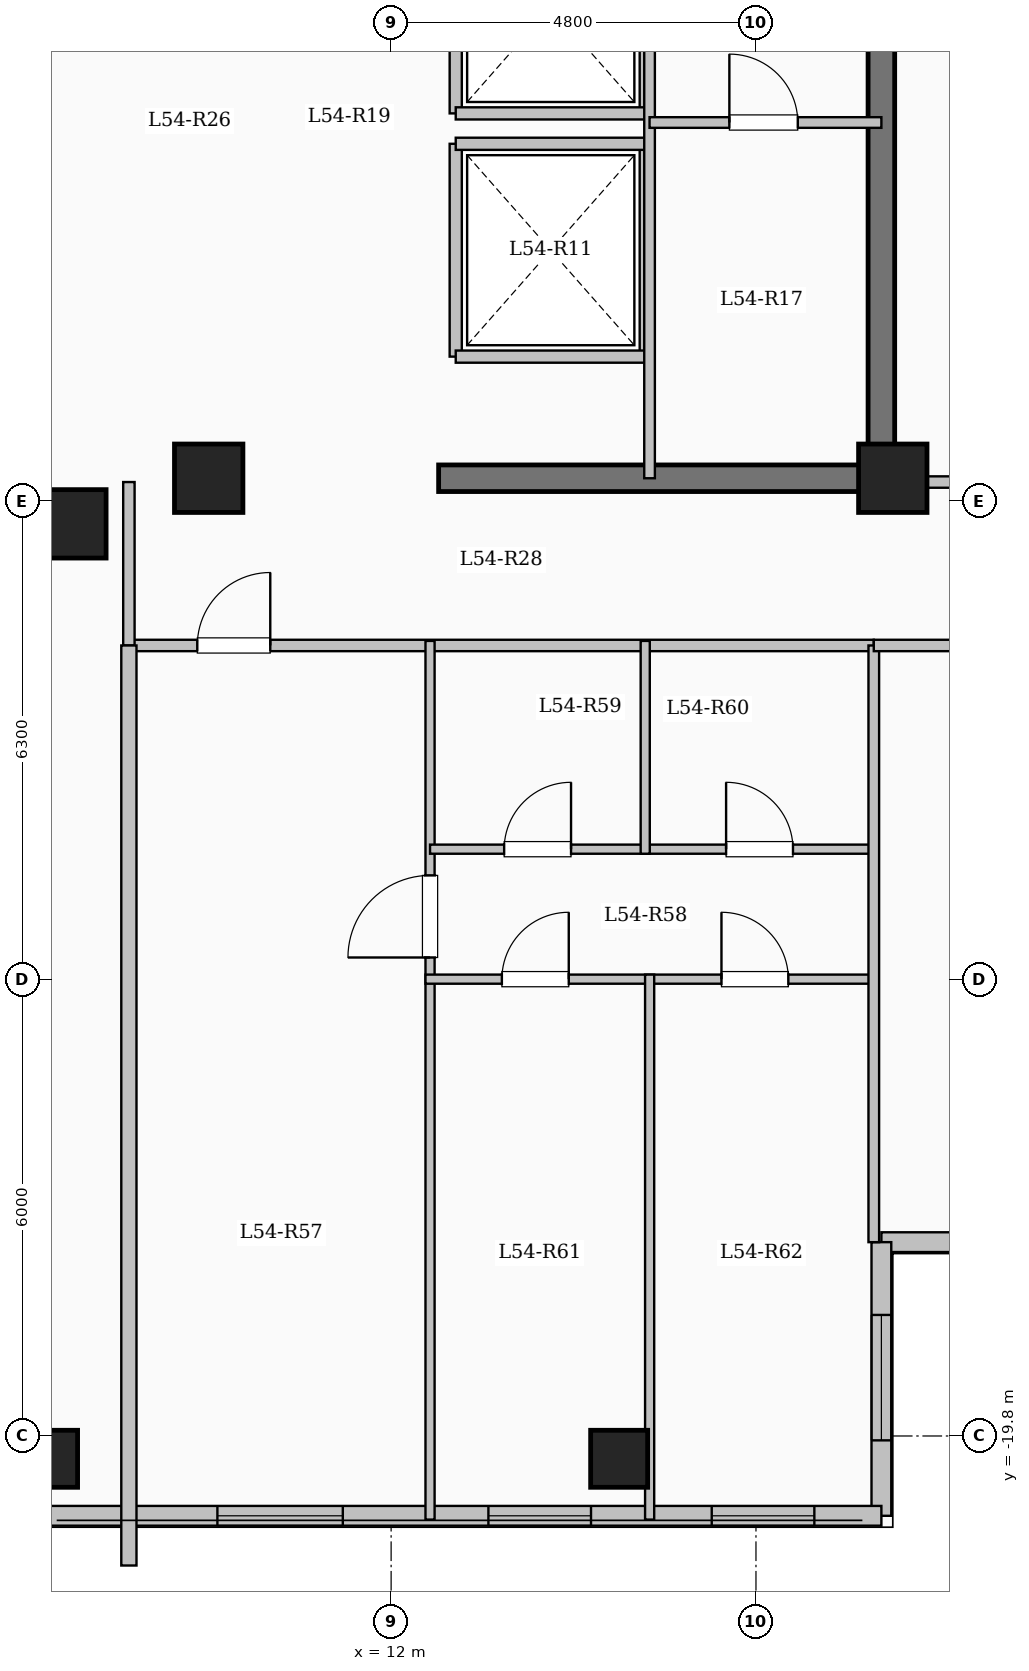
"""IFC4 building model, lengths in metres.
Left out: names, types, materials, properties, quantities, classifications, styles, units other than length and angle.
Written with IfcOpenShell. Run it as: python <this file> out.ifc"""

import sys

from ifc_helpers import new_model, si_unit, direction, frame, frame_2d, origin, origin_2d, place, context, subcontext, project, spatial, rectangle, extrude, element, fill, save


model = new_model("IFC4")
c1 = context("Model", 3, precision=1e-05, world=origin(), true_north=direction((0.0, 1.0)))
c2 = subcontext(c1, "Body", "Model", "MODEL_VIEW")
j1 = project(units=[si_unit("LENGTHUNIT", "METRE"), si_unit("PLANEANGLEUNIT", "RADIAN")], contexts=[c1])
p1 = place(None, origin())
s1 = spatial("IfcSite", under=j1, at=p1, CompositionType="ELEMENT")
p2 = place(p1, origin())
s2 = spatial("IfcBuilding", under=s1, at=p2, CompositionType="ELEMENT")
p3 = place(p2, frame((0.0, 0.0, 200.3)))
s3 = spatial("IfcBuildingStorey", under=s2, at=p3, CompositionType="ELEMENT", Elevation=200.3)
for number, where, z_axis, x_axis in (
    (1, (7.8, -7.8, 0.0), (0.0, 0.0, 1.0), (1.0, 0.0, 0.0)),
    (2, (9.6, -7.2, 0.0), (0.0, 0.0, 1.0), (1.0, 0.0, 0.0)),
    (3, (18.6, -7.2, 0.0), (0.0, 0.0, 1.0), (1.0, 0.0, 0.0)),
):
    element("IfcColumn", number, at=place(p3, frame(where, z_axis=z_axis, x_axis=x_axis)), inside=s3, PredefinedType="COLUMN", context=c2, shape_type="SweptSolid", body=[
        extrude(rectangle(XDim=0.9, YDim=0.9, at=origin_2d()), origin(), (0.0, 0.0, 1.0), 3.35),
    ])
for number, where, z_axis, x_axis in (
    (4, (7.5, -20.1, 0.0), (0.0, 0.0, 1.0), (1.0, 0.0, 0.0)),
    (5, (15.0, -20.1, 0.0), (0.0, 0.0, 1.0), (1.0, 0.0, 0.0)),
):
    element("IfcColumn", number, at=place(p3, frame(where, z_axis=z_axis, x_axis=x_axis)), inside=s3, PredefinedType="COLUMN", context=c2, shape_type="SweptSolid", body=[
        extrude(rectangle(XDim=0.75, YDim=0.75, at=origin_2d()), origin(), (0.0, 0.0, 1.0), 3.35),
    ])
p4 = place(p3, frame((23.55, -17.25, 0.0), z_axis=(0.0, 0.0, 1.0), x_axis=(-1.0, 0.0, 0.0)))
e6 = element("IfcWall", 6, at=p4, inside=s3, PredefinedType="SOLIDWALL", context=c2, shape_type="SweptSolid", body=[
    extrude(rectangle(XDim=5.1, YDim=0.26, at=frame_2d((2.55, 0.0))), origin(), (0.0, 0.0, 1.0), 3.1),
])
p5 = place(p4, frame((1.475, 0.0, 0.9)))
e7 = element("IfcOpeningElement", 7, at=p5, cuts=e6, PredefinedType="OPENING", context=c2, shape_type="SweptSolid", body=[
    extrude(rectangle(XDim=2.2, YDim=1.75, at=frame_2d((1.1, 0.875))), frame((0.0, 0.14, 0.0), z_axis=(0.0, -1.0, 0.0), x_axis=(1.0, 0.0, 0.0)), (0.0, 0.0, 1.0), 0.28),
])
p6 = place(p3, frame((18.45, -17.25, 0.0), z_axis=(0.0, 0.0, 1.0), x_axis=(0.0, -1.0, 0.0)))
e8 = element("IfcWall", 8, at=p6, inside=s3, PredefinedType="SOLIDWALL", context=c2, shape_type="SweptSolid", body=[
    extrude(rectangle(XDim=3.6, YDim=0.26, at=frame_2d((1.8, 0.0))), origin(), (0.0, 0.0, 1.0), 3.1),
])
p7 = place(p6, frame((0.958, 0.0, 0.9)))
e9 = element("IfcOpeningElement", 9, at=p7, cuts=e8, PredefinedType="OPENING", context=c2, shape_type="SweptSolid", body=[
    extrude(rectangle(XDim=1.65, YDim=1.6, at=frame_2d((0.825, 0.8))), frame((0.0, 0.14, 0.0), z_axis=(0.0, -1.0, 0.0), x_axis=(1.0, 0.0, 0.0)), (0.0, 0.0, 1.0), 0.28),
])
p8 = place(p3, frame((18.45, -20.85, 0.0), z_axis=(0.0, 0.0, 1.0), x_axis=(-1.0, 0.0, 0.0)))
e10 = element("IfcWall", 10, at=p8, inside=s3, PredefinedType="SOLIDWALL", context=c2, shape_type="SweptSolid", body=[
    extrude(rectangle(XDim=11.1, YDim=0.26, at=frame_2d((5.55, 0.0))), origin(), (0.0, 0.0, 1.0), 3.1),
])
p9 = place(p8, frame((0.882, 0.0, 0.95)))
e11 = element("IfcOpeningElement", 11, at=p9, cuts=e10, PredefinedType="OPENING", context=c2, shape_type="SweptSolid", body=[
    extrude(rectangle(XDim=1.35, YDim=1.55, at=frame_2d((0.675, 0.775))), frame((0.0, 0.14, 0.0), z_axis=(0.0, -1.0, 0.0), x_axis=(1.0, 0.0, 0.0)), (0.0, 0.0, 1.0), 0.28),
])
p10 = place(p8, frame((3.82, 0.0, 0.95)))
e12 = element("IfcOpeningElement", 12, at=p10, cuts=e10, PredefinedType="OPENING", context=c2, shape_type="SweptSolid", body=[
    extrude(rectangle(XDim=1.35, YDim=1.55, at=frame_2d((0.675, 0.775))), frame((0.0, 0.14, 0.0), z_axis=(0.0, -1.0, 0.0), x_axis=(1.0, 0.0, 0.0)), (0.0, 0.0, 1.0), 0.28),
])
p11 = place(p8, frame((7.086, 0.0, 0.9)))
e13 = element("IfcOpeningElement", 13, at=p11, cuts=e10, PredefinedType="OPENING", context=c2, shape_type="SweptSolid", body=[
    extrude(rectangle(XDim=1.65, YDim=1.6, at=frame_2d((0.825, 0.8))), frame((0.0, 0.14, 0.0), z_axis=(0.0, -1.0, 0.0), x_axis=(1.0, 0.0, 0.0)), (0.0, 0.0, 1.0), 0.28),
])
for number, where, z_axis, x_axis in (
    (14, (12.85, -5.6, 0.0), (0.0, 0.0, 1.0), (0.0, 1.0, 0.0)),
    (15, (15.35, -5.6, 0.0), (0.0, 0.0, 1.0), (0.0, 1.0, 0.0)),
):
    element("IfcWall", number, at=place(p3, frame(where, z_axis=z_axis, x_axis=x_axis)), inside=s3, PredefinedType="SOLIDWALL", context=c2, shape_type="SweptSolid", body=[
        extrude(rectangle(XDim=2.8, YDim=0.16, at=frame_2d((1.4, 0.0))), origin(), (0.0, 0.0, 1.0), 3.1),
    ])
for number, where, z_axis, x_axis in (
    (16, (12.85, -5.6, 0.0), (0.0, 0.0, 1.0), (1.0, 0.0, 0.0)),
    (17, (12.85, -2.8, 0.0), (0.0, 0.0, 1.0), (1.0, 0.0, 0.0)),
):
    element("IfcWall", number, at=place(p3, frame(where, z_axis=z_axis, x_axis=x_axis)), inside=s3, PredefinedType="SOLIDWALL", context=c2, shape_type="SweptSolid", body=[
        extrude(rectangle(XDim=2.5, YDim=0.16, at=frame_2d((1.25, 0.0))), origin(), (0.0, 0.0, 1.0), 3.1),
    ])
for number, where, z_axis, x_axis in (
    (18, (12.85, -2.4, 0.0), (0.0, 0.0, 1.0), (0.0, 1.0, 0.0)),
    (19, (15.35, -2.4, 0.0), (0.0, 0.0, 1.0), (0.0, 1.0, 0.0)),
):
    element("IfcWall", number, at=place(p3, frame(where, z_axis=z_axis, x_axis=x_axis)), inside=s3, PredefinedType="SOLIDWALL", context=c2, shape_type="SweptSolid", body=[
        extrude(rectangle(XDim=2.8, YDim=0.16, at=frame_2d((1.4, 0.0))), origin(), (0.0, 0.0, 1.0), 3.1),
    ])
p12 = place(p3, frame((12.85, -2.4, 0.0), z_axis=(0.0, 0.0, 1.0), x_axis=(1.0, 0.0, 0.0)))
e20 = element("IfcWall", 20, at=p12, inside=s3, PredefinedType="SOLIDWALL", context=c2, shape_type="SweptSolid", body=[
    extrude(rectangle(XDim=2.5, YDim=0.16, at=frame_2d((1.25, 0.0))), origin(), (0.0, 0.0, 1.0), 3.1),
])
p13 = place(p3, frame((18.45, -7.375, 0.0), z_axis=(0.0, 0.0, 1.0), x_axis=(0.0, 1.0, 0.0)))
e21 = element("IfcWall", 21, at=p13, inside=s3, PredefinedType="SHEAR", context=c2, shape_type="SweptSolid", body=[
    extrude(rectangle(XDim=14.05, YDim=0.35, at=frame_2d((7.025, 0.0))), origin(), (0.0, 0.0, 1.0), 3.35),
])
p14 = place(p3, frame((12.625, -7.2, 0.0), z_axis=(0.0, 0.0, 1.0), x_axis=(1.0, 0.0, 0.0)))
e22 = element("IfcWall", 22, at=p14, inside=s3, PredefinedType="SHEAR", context=c2, shape_type="SweptSolid", body=[
    extrude(rectangle(XDim=6.0, YDim=0.35, at=frame_2d((3.0, 0.0))), origin(), (0.0, 0.0, 1.0), 3.35),
])
p15 = place(p3, frame((15.4, -7.2, 0.0), z_axis=(0.0, 0.0, 1.0), x_axis=(0.0, 1.0, 0.0)))
e23 = element("IfcWall", 23, at=p15, inside=s3, PredefinedType="PARTITIONING", context=c2, shape_type="SweptSolid", body=[
    extrude(rectangle(XDim=10.45, YDim=0.14, at=frame_2d((5.225, 0.0))), origin(), (0.0, 0.0, 1.0), 3.1),
])
p16 = place(p15, frame((9.25, 0.0, 0.0)))
e24 = element("IfcOpeningElement", 24, at=p16, cuts=e23, PredefinedType="OPENING", context=c2, shape_type="SweptSolid", body=[
    extrude(rectangle(XDim=0.9, YDim=2.08, at=frame_2d((0.45, 1.04))), frame((0.0, 0.08, 0.0), z_axis=(0.0, -1.0, 0.0), x_axis=(1.0, 0.0, 0.0)), (0.0, 0.0, 1.0), 0.16),
])
p17 = place(p3, frame((15.4, -2.52, 0.0), z_axis=(0.0, 0.0, 1.0), x_axis=(1.0, 0.0, 0.0)))
e25 = element("IfcWall", 25, at=p17, inside=s3, PredefinedType="PARTITIONING", context=c2, shape_type="SweptSolid", body=[
    extrude(rectangle(XDim=3.05, YDim=0.14, at=frame_2d((1.525, 0.0))), origin(), (0.0, 0.0, 1.0), 3.1),
])
p18 = place(p17, frame((1.05, 0.0, 0.0)))
e26 = element("IfcOpeningElement", 26, at=p18, cuts=e25, PredefinedType="OPENING", context=c2, shape_type="SweptSolid", body=[
    extrude(rectangle(XDim=0.9, YDim=2.08, at=frame_2d((0.45, 1.04))), frame((0.0, 0.08, 0.0), z_axis=(0.0, -1.0, 0.0), x_axis=(1.0, 0.0, 0.0)), (0.0, 0.0, 1.0), 0.16),
])
p19 = place(p3, frame((8.55, -9.4, 0.0), z_axis=(0.0, 0.0, 1.0), x_axis=(1.0, 0.0, 0.0)))
e27 = element("IfcWall", 27, at=p19, inside=s3, PredefinedType="PARTITIONING", context=c2, shape_type="SweptSolid", body=[
    extrude(rectangle(XDim=9.8, YDim=0.15, at=frame_2d((4.9, 0.0))), origin(), (0.0, 0.0, 1.0), 3.1),
])
p20 = place(p19, frame((0.9, 0.0, 0.0)))
e28 = element("IfcOpeningElement", 28, at=p20, cuts=e27, PredefinedType="OPENING", context=c2, shape_type="SweptSolid", body=[
    extrude(rectangle(XDim=0.96, YDim=2.15, at=frame_2d((0.48, 1.075))), frame((0.0, 0.085, 0.0), z_axis=(0.0, -1.0, 0.0), x_axis=(1.0, 0.0, 0.0)), (0.0, 0.0, 1.0), 0.17),
])
p21 = place(p3, frame((8.55, -9.4, 0.0), z_axis=(0.0, 0.0, 1.0), x_axis=(0.0, 1.0, 0.0)))
e29 = element("IfcWall", 29, at=p21, inside=s3, PredefinedType="PARTITIONING", context=c2, shape_type="SweptSolid", body=[
    extrude(rectangle(XDim=2.15, YDim=0.15, at=frame_2d((1.075, 0.0))), origin(), (0.0, 0.0, 1.0), 3.1),
])
p22 = place(p3, frame((12.512, -20.9, 0.0), z_axis=(0.0, 0.0, 1.0), x_axis=(0.0, 1.0, 0.0)))
e30 = element("IfcWall", 30, at=p22, inside=s3, PredefinedType="PARTITIONING", context=c2, shape_type="SweptSolid", body=[
    extrude(rectangle(XDim=11.56, YDim=0.12, at=frame_2d((5.78, 0.0))), origin(), (0.0, 0.0, 1.0), 3.1),
])
p23 = place(p22, frame((7.395, 0.0, 0.0)))
e31 = element("IfcOpeningElement", 31, at=p23, cuts=e30, PredefinedType="OPENING", context=c2, shape_type="SweptSolid", body=[
    extrude(rectangle(XDim=1.08, YDim=2.15, at=frame_2d((0.54, 1.075))), frame((0.0, 0.07, 0.0), z_axis=(0.0, -1.0, 0.0), x_axis=(1.0, 0.0, 0.0)), (0.0, 0.0, 1.0), 0.14),
])
p24 = place(p3, frame((12.512, -12.08, 0.0), z_axis=(0.0, 0.0, 1.0), x_axis=(1.0, 0.0, 0.0)))
e32 = element("IfcWall", 32, at=p24, inside=s3, PredefinedType="PARTITIONING", context=c2, shape_type="SweptSolid", body=[
    extrude(rectangle(XDim=2.831, YDim=0.12, at=frame_2d((1.416, 0.0))), origin(), (0.0, 0.0, 1.0), 2.725),
])
p25 = place(p24, frame((0.975, 0.0, 0.0)))
e33 = element("IfcOpeningElement", 33, at=p25, cuts=e32, PredefinedType="OPENING", context=c2, shape_type="SweptSolid", body=[
    extrude(rectangle(XDim=0.88, YDim=2.1, at=frame_2d((0.44, 1.05))), frame((0.0, 0.07, 0.0), z_axis=(0.0, -1.0, 0.0), x_axis=(1.0, 0.0, 0.0)), (0.0, 0.0, 1.0), 0.14),
])
p26 = place(p3, frame((15.343, -12.08, 0.0), z_axis=(0.0, 0.0, 1.0), x_axis=(1.0, 0.0, 0.0)))
e34 = element("IfcWall", 34, at=p26, inside=s3, PredefinedType="PARTITIONING", context=c2, shape_type="SweptSolid", body=[
    extrude(rectangle(XDim=3.007, YDim=0.12, at=frame_2d((1.503, 0.0))), origin(), (0.0, 0.0, 1.0), 3.1),
])
p27 = place(p26, frame((1.064, 0.0, 0.0)))
e35 = element("IfcOpeningElement", 35, at=p27, cuts=e34, PredefinedType="OPENING", context=c2, shape_type="SweptSolid", body=[
    extrude(rectangle(XDim=0.88, YDim=2.1, at=frame_2d((0.44, 1.05))), frame((0.0, 0.07, 0.0), z_axis=(0.0, -1.0, 0.0), x_axis=(1.0, 0.0, 0.0)), (0.0, 0.0, 1.0), 0.14),
])
p28 = place(p3, frame((12.452, -13.79, 0.0), z_axis=(0.0, 0.0, 1.0), x_axis=(1.0, 0.0, 0.0)))
e36 = element("IfcWall", 36, at=p28, inside=s3, PredefinedType="PARTITIONING", context=c2, shape_type="SweptSolid", body=[
    extrude(rectangle(XDim=5.958, YDim=0.12, at=frame_2d((2.979, 0.0))), origin(), (0.0, 0.0, 1.0), 2.725),
])
p29 = place(p28, frame((1.005, 0.0, 0.0)))
e37 = element("IfcOpeningElement", 37, at=p29, cuts=e36, PredefinedType="OPENING", context=c2, shape_type="SweptSolid", body=[
    extrude(rectangle(XDim=0.88, YDim=2.1, at=frame_2d((0.44, 1.05))), frame((0.0, 0.07, 0.0), z_axis=(0.0, -1.0, 0.0), x_axis=(1.0, 0.0, 0.0)), (0.0, 0.0, 1.0), 0.14),
])
p30 = place(p28, frame((3.894, 0.0, 0.0)))
e38 = element("IfcOpeningElement", 38, at=p30, cuts=e36, PredefinedType="OPENING", context=c2, shape_type="SweptSolid", body=[
    extrude(rectangle(XDim=0.88, YDim=2.1, at=frame_2d((0.44, 1.05))), frame((0.0, 0.07, 0.0), z_axis=(0.0, -1.0, 0.0), x_axis=(1.0, 0.0, 0.0)), (0.0, 0.0, 1.0), 0.14),
])
p31 = place(p3, frame((15.343, -12.14, 0.0), z_axis=(0.0, 0.0, 1.0), x_axis=(0.0, 1.0, 0.0)))
e39 = element("IfcWall", 39, at=p31, inside=s3, PredefinedType="PARTITIONING", context=c2, shape_type="SweptSolid", body=[
    extrude(rectangle(XDim=2.8, YDim=0.12, at=frame_2d((1.4, 0.0))), origin(), (0.0, 0.0, 1.0), 3.1),
])
p32 = place(p3, frame((15.401, -20.9, 0.0), z_axis=(0.0, 0.0, 1.0), x_axis=(0.0, 1.0, 0.0)))
e40 = element("IfcWall", 40, at=p32, inside=s3, PredefinedType="PARTITIONING", context=c2, shape_type="SweptSolid", body=[
    extrude(rectangle(XDim=7.17, YDim=0.12, at=frame_2d((3.585, 0.0))), origin(), (0.0, 0.0, 1.0), 3.1),
])
p33 = place(p3, frame((8.55, -21.504, 0.0), z_axis=(0.0, 0.0, 1.0), x_axis=(0.0, 1.0, 0.0)))
e41 = element("IfcWall", 41, at=p33, inside=s3, PredefinedType="SOLIDWALL", context=c2, shape_type="SweptSolid", body=[
    extrude(rectangle(XDim=12.104, YDim=0.2, at=frame_2d((6.052, 0.0))), origin(), (0.0, 0.0, 1.0), 3.1),
])
p34 = place(p3, frame((18.45, -7.25, 0.0), z_axis=(0.0, 0.0, 1.0), x_axis=(1.0, 0.0, 0.0)))
e42 = element("IfcWall", 42, at=p34, inside=s3, PredefinedType="PARTITIONING", context=c2, shape_type="SweptSolid", body=[
    extrude(rectangle(XDim=5.13, YDim=0.15, at=frame_2d((2.565, 0.0))), origin(), (0.0, 0.0, 1.0), 3.1),
])
p35 = place(p34, frame((1.95, 0.0, 0.0)))
e43 = element("IfcOpeningElement", 43, at=p35, cuts=e42, PredefinedType="OPENING", context=c2, shape_type="SweptSolid", body=[
    extrude(rectangle(XDim=0.96, YDim=2.15, at=frame_2d((0.48, 1.075))), frame((0.0, 0.085, 0.0), z_axis=(0.0, -1.0, 0.0), x_axis=(1.0, 0.0, 0.0)), (0.0, 0.0, 1.0), 0.17),
])
p36 = place(p3, frame((18.35, -17.25, 0.0), z_axis=(0.0, 0.0, 1.0), x_axis=(0.0, 1.0, 0.0)))
e44 = element("IfcWall", 44, at=p36, inside=s3, PredefinedType="PARTITIONING", context=c2, shape_type="SweptSolid", body=[
    extrude(rectangle(XDim=7.85, YDim=0.14, at=frame_2d((3.925, 0.0))), origin(), (0.0, 0.0, 1.0), 3.1),
])
p37 = place(p3, frame((18.35, -9.4, 0.0), z_axis=(0.0, 0.0, 1.0), x_axis=(1.0, 0.0, 0.0)))
e45 = element("IfcWall", 45, at=p37, inside=s3, PredefinedType="PARTITIONING", context=c2, shape_type="SweptSolid", body=[
    extrude(rectangle(XDim=5.23, YDim=0.15, at=frame_2d((2.615, 0.0))), origin(), (0.0, 0.0, 1.0), 3.1),
])
p38 = place(p37, frame((2.14, 0.0, 0.0)))
e46 = element("IfcOpeningElement", 46, at=p38, cuts=e45, PredefinedType="OPENING", context=c2, shape_type="SweptSolid", body=[
    extrude(rectangle(XDim=0.95, YDim=2.15, at=frame_2d((0.475, 1.075))), frame((0.0, 0.085, 0.0), z_axis=(0.0, -1.0, 0.0), x_axis=(1.0, 0.0, 0.0)), (0.0, 0.0, 1.0), 0.17),
])
p39 = place(p7, origin())
e47 = element("IfcWindow", 47, at=p39, inside=s3, PartitioningType="SINGLE_PANEL", PredefinedType="WINDOW", context=c2, shape_type="SweptSolid", body=[
    extrude(rectangle(XDim=1.65, YDim=1.6, at=frame_2d((0.825, 0.8))), frame((0.0, 0.03, 0.0), z_axis=(0.0, -1.0, 0.0), x_axis=(1.0, 0.0, 0.0)), (0.0, 0.0, 1.0), 0.06),
])
fill(e9, e47)
p40 = place(p9, origin())
e48 = element("IfcWindow", 48, at=p40, inside=s3, PartitioningType="SINGLE_PANEL", PredefinedType="WINDOW", context=c2, shape_type="SweptSolid", body=[
    extrude(rectangle(XDim=1.35, YDim=1.55, at=frame_2d((0.675, 0.775))), frame((0.0, 0.03, 0.0), z_axis=(0.0, -1.0, 0.0), x_axis=(1.0, 0.0, 0.0)), (0.0, 0.0, 1.0), 0.06),
])
fill(e11, e48)
p41 = place(p10, origin())
e49 = element("IfcWindow", 49, at=p41, inside=s3, PartitioningType="SINGLE_PANEL", PredefinedType="WINDOW", context=c2, shape_type="SweptSolid", body=[
    extrude(rectangle(XDim=1.35, YDim=1.55, at=frame_2d((0.675, 0.775))), frame((0.0, 0.03, 0.0), z_axis=(0.0, -1.0, 0.0), x_axis=(1.0, 0.0, 0.0)), (0.0, 0.0, 1.0), 0.06),
])
fill(e12, e49)
p42 = place(p11, origin())
e50 = element("IfcWindow", 50, at=p42, inside=s3, PartitioningType="SINGLE_PANEL", PredefinedType="WINDOW", context=c2, shape_type="SweptSolid", body=[
    extrude(rectangle(XDim=1.65, YDim=1.6, at=frame_2d((0.825, 0.8))), frame((0.0, 0.03, 0.0), z_axis=(0.0, -1.0, 0.0), x_axis=(1.0, 0.0, 0.0)), (0.0, 0.0, 1.0), 0.06),
])
fill(e13, e50)
p43 = place(p18, origin())
e51 = element("IfcDoor", 51, at=p43, inside=s3, OperationType="SINGLE_SWING_LEFT", PredefinedType="DOOR", context=c2, shape_type="SweptSolid", body=[
    extrude(rectangle(XDim=0.9, YDim=2.08, at=frame_2d((0.45, 1.04))), frame((0.0, 0.025, 0.0), z_axis=(0.0, -1.0, 0.0), x_axis=(1.0, 0.0, 0.0)), (0.0, 0.0, 1.0), 0.05),
])
fill(e26, e51)
p44 = place(p20, origin())
e52 = element("IfcDoor", 52, at=p44, inside=s3, OperationType="SINGLE_SWING_RIGHT", PredefinedType="DOOR", context=c2, shape_type="SweptSolid", body=[
    extrude(rectangle(XDim=0.96, YDim=2.15, at=frame_2d((0.48, 1.075))), frame((0.0, 0.025, 0.0), z_axis=(0.0, -1.0, 0.0), x_axis=(1.0, 0.0, 0.0)), (0.0, 0.0, 1.0), 0.05),
])
fill(e28, e52)
p45 = place(p23, origin())
e53 = element("IfcDoor", 53, at=p45, inside=s3, OperationType="SINGLE_SWING_LEFT", PredefinedType="DOOR", context=c2, shape_type="SweptSolid", body=[
    extrude(rectangle(XDim=1.08, YDim=2.15, at=frame_2d((0.54, 1.075))), frame((0.0, 0.025, 0.0), z_axis=(0.0, -1.0, 0.0), x_axis=(1.0, 0.0, 0.0)), (0.0, 0.0, 1.0), 0.05),
])
fill(e31, e53)
p46 = place(p25, origin())
e54 = element("IfcDoor", 54, at=p46, inside=s3, OperationType="SINGLE_SWING_RIGHT", PredefinedType="DOOR", context=c2, shape_type="SweptSolid", body=[
    extrude(rectangle(XDim=0.88, YDim=2.1, at=frame_2d((0.44, 1.05))), frame((0.0, 0.025, 0.0), z_axis=(0.0, -1.0, 0.0), x_axis=(1.0, 0.0, 0.0)), (0.0, 0.0, 1.0), 0.05),
])
fill(e33, e54)
p47 = place(p27, origin())
e55 = element("IfcDoor", 55, at=p47, inside=s3, OperationType="SINGLE_SWING_LEFT", PredefinedType="DOOR", context=c2, shape_type="SweptSolid", body=[
    extrude(rectangle(XDim=0.88, YDim=2.1, at=frame_2d((0.44, 1.05))), frame((0.0, 0.025, 0.0), z_axis=(0.0, -1.0, 0.0), x_axis=(1.0, 0.0, 0.0)), (0.0, 0.0, 1.0), 0.05),
])
fill(e35, e55)
p48 = place(p29, origin())
e56 = element("IfcDoor", 56, at=p48, inside=s3, OperationType="SINGLE_SWING_RIGHT", PredefinedType="DOOR", context=c2, shape_type="SweptSolid", body=[
    extrude(rectangle(XDim=0.88, YDim=2.1, at=frame_2d((0.44, 1.05))), frame((0.0, 0.025, 0.0), z_axis=(0.0, -1.0, 0.0), x_axis=(1.0, 0.0, 0.0)), (0.0, 0.0, 1.0), 0.05),
])
fill(e37, e56)
p49 = place(p30, origin())
e57 = element("IfcDoor", 57, at=p49, inside=s3, OperationType="SINGLE_SWING_LEFT", PredefinedType="DOOR", context=c2, shape_type="SweptSolid", body=[
    extrude(rectangle(XDim=0.88, YDim=2.1, at=frame_2d((0.44, 1.05))), frame((0.0, 0.025, 0.0), z_axis=(0.0, -1.0, 0.0), x_axis=(1.0, 0.0, 0.0)), (0.0, 0.0, 1.0), 0.05),
])
fill(e38, e57)
save(model, sys.argv[1])
